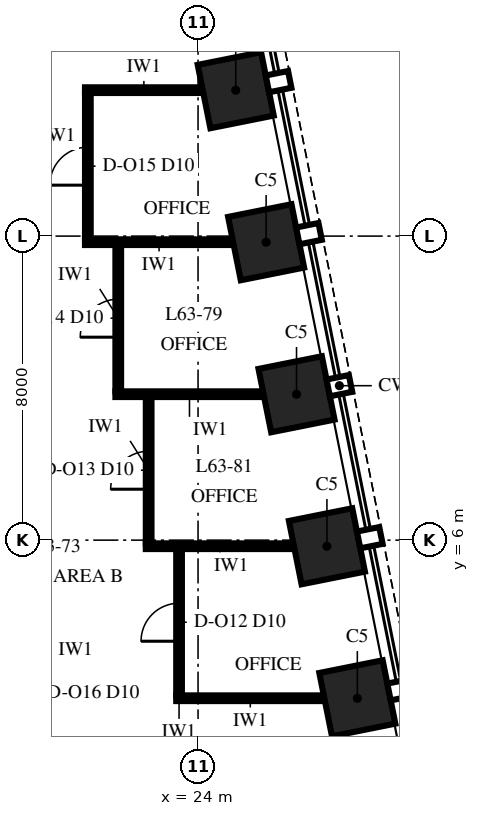
"""IFC4 building model, lengths in metres.
Left out: names, types, materials, properties, quantities, classifications, styles, units other than length and angle.
Written with IfcOpenShell. Run it as: python <this file> out.ifc"""

import sys

from ifc_helpers import new_model, si_unit, direction, frame, frame_2d, origin, origin_2d, place, context, subcontext, project, spatial, rectangle, extrude, element, fill, save


model = new_model("IFC4")
c1 = context("Model", 3, precision=1e-05, world=origin(), true_north=direction((0.0, 1.0)))
c2 = subcontext(c1, "Body", "Model", "MODEL_VIEW")
j1 = project(units=[si_unit("LENGTHUNIT", "METRE"), si_unit("PLANEANGLEUNIT", "RADIAN")], contexts=[c1])
p1 = place(None, origin())
s1 = spatial("IfcSite", under=j1, at=p1, CompositionType="ELEMENT")
p2 = place(p1, origin())
s2 = spatial("IfcBuilding", under=s1, at=p2, CompositionType="ELEMENT")
p3 = place(p2, frame((0.0, 0.0, 272.0)))
s3 = spatial("IfcBuildingStorey", under=s2, at=p3, CompositionType="ELEMENT", Elevation=272.0)
for number, where, z_axis, x_axis in (
    (1, (28.191, 1.838, 0.0), (0.0, 0.0, 1.0), (-0.196, 0.981, 0.0)),
    (2, (27.391, 5.838, 0.0), (0.0, 0.0, 1.0), (-0.196, 0.981, 0.0)),
    (3, (26.591, 9.838, 0.0), (0.0, 0.0, 1.0), (-0.196, 0.981, 0.0)),
    (4, (25.791, 13.838, 0.0), (0.0, 0.0, 1.0), (-0.196, 0.981, 0.0)),
    (5, (24.991, 17.838, 0.0), (0.0, 0.0, 1.0), (-0.196, 0.981, 0.0)),
):
    element("IfcColumn", number, at=place(p3, frame(where, z_axis=z_axis, x_axis=x_axis)), inside=s3, PredefinedType="COLUMN", context=c2, shape_type="SweptSolid", body=[
        extrude(rectangle(XDim=1.7, YDim=1.7, at=origin_2d()), origin(), (0.0, 0.0, 1.0), 4.0),
    ])
p4 = place(p3, frame((23.425, 1.84, 0.0), z_axis=(0.0, 0.0, 1.0), x_axis=(1.0, 0.0, 0.0)))
e6 = element("IfcWall", 6, at=p4, inside=s3, PredefinedType="PARTITIONING", context=c2, shape_type="SweptSolid", body=[
    extrude(rectangle(XDim=3.899, YDim=0.15, at=frame_2d((1.949, 0.0))), origin(), (0.0, 0.0, 1.0), 3.23),
])
p5 = place(p3, frame((22.625, 5.84, 0.0), z_axis=(0.0, 0.0, 1.0), x_axis=(1.0, 0.0, 0.0)))
e7 = element("IfcWall", 7, at=p5, inside=s3, PredefinedType="PARTITIONING", context=c2, shape_type="SweptSolid", body=[
    extrude(rectangle(XDim=3.899, YDim=0.15, at=frame_2d((1.949, 0.0))), origin(), (0.0, 0.0, 1.0), 2.842),
])
for number, where, z_axis, x_axis in (
    (8, (21.825, 9.84, 0.0), (0.0, 0.0, 1.0), (1.0, 0.0, 0.0)),
    (9, (21.025, 13.84, 0.0), (0.0, 0.0, 1.0), (1.0, 0.0, 0.0)),
):
    element("IfcWall", number, at=place(p3, frame(where, z_axis=z_axis, x_axis=x_axis)), inside=s3, PredefinedType="PARTITIONING", context=c2, shape_type="SweptSolid", body=[
        extrude(rectangle(XDim=3.899, YDim=0.15, at=frame_2d((1.949, 0.0))), origin(), (0.0, 0.0, 1.0), 3.23),
    ])
p6 = place(p3, frame((21.025, 17.84, 0.0), z_axis=(0.0, 0.0, 1.0), x_axis=(1.0, 0.0, 0.0)))
e10 = element("IfcWall", 10, at=p6, inside=s3, PredefinedType="PARTITIONING", context=c2, shape_type="SweptSolid", body=[
    extrude(rectangle(XDim=3.099, YDim=0.15, at=frame_2d((1.549, 0.0))), origin(), (0.0, 0.0, 1.0), 3.23),
])
p7 = place(p3, frame((21.1, 13.915, 0.0), z_axis=(0.0, 0.0, 1.0), x_axis=(0.0, 1.0, 0.0)))
e11 = element("IfcWall", 11, at=p7, inside=s3, PredefinedType="PARTITIONING", context=c2, shape_type="SweptSolid", body=[
    extrude(rectangle(XDim=3.85, YDim=0.15, at=frame_2d((1.925, 0.0))), origin(), (0.0, 0.0, 1.0), 3.23),
])
p8 = place(p7, frame((1.425, 0.0, 0.0)))
e12 = element("IfcOpeningElement", 12, at=p8, cuts=e11, PredefinedType="OPENING", context=c2, shape_type="SweptSolid", body=[
    extrude(rectangle(XDim=1.0, YDim=2.3, at=frame_2d((0.5, 1.15))), frame((0.0, 0.09, 0.0), z_axis=(0.0, -1.0, 0.0), x_axis=(1.0, 0.0, 0.0)), (0.0, 0.0, 1.0), 0.18),
])
p9 = place(p3, frame((21.9, 9.915, 0.0), z_axis=(0.0, 0.0, 1.0), x_axis=(0.0, 1.0, 0.0)))
e13 = element("IfcWall", 13, at=p9, inside=s3, PredefinedType="PARTITIONING", context=c2, shape_type="SweptSolid", body=[
    extrude(rectangle(XDim=3.85, YDim=0.15, at=frame_2d((1.925, 0.0))), origin(), (0.0, 0.0, 1.0), 3.85),
])
p10 = place(p9, frame((1.425, 0.0, 0.0)))
e14 = element("IfcOpeningElement", 14, at=p10, cuts=e13, PredefinedType="OPENING", context=c2, shape_type="SweptSolid", body=[
    extrude(rectangle(XDim=1.0, YDim=2.3, at=frame_2d((0.5, 1.15))), frame((0.0, 0.09, 0.0), z_axis=(0.0, -1.0, 0.0), x_axis=(1.0, 0.0, 0.0)), (0.0, 0.0, 1.0), 0.18),
])
p11 = place(p3, frame((22.7, 5.915, 0.0), z_axis=(0.0, 0.0, 1.0), x_axis=(0.0, 1.0, 0.0)))
e15 = element("IfcWall", 15, at=p11, inside=s3, PredefinedType="PARTITIONING", context=c2, shape_type="SweptSolid", body=[
    extrude(rectangle(XDim=3.85, YDim=0.15, at=frame_2d((1.925, 0.0))), origin(), (0.0, 0.0, 1.0), 2.842),
])
p12 = place(p11, frame((1.425, 0.0, 0.0)))
e16 = element("IfcOpeningElement", 16, at=p12, cuts=e15, PredefinedType="OPENING", context=c2, shape_type="SweptSolid", body=[
    extrude(rectangle(XDim=1.0, YDim=2.3, at=frame_2d((0.5, 1.15))), frame((0.0, 0.09, 0.0), z_axis=(0.0, -1.0, 0.0), x_axis=(1.0, 0.0, 0.0)), (0.0, 0.0, 1.0), 0.18),
])
p13 = place(p3, frame((23.5, 1.915, 0.0), z_axis=(0.0, 0.0, 1.0), x_axis=(0.0, 1.0, 0.0)))
e17 = element("IfcWall", 17, at=p13, inside=s3, PredefinedType="PARTITIONING", context=c2, shape_type="SweptSolid", body=[
    extrude(rectangle(XDim=3.85, YDim=0.15, at=frame_2d((1.925, 0.0))), origin(), (0.0, 0.0, 1.0), 3.85),
])
p14 = place(p13, frame((1.425, 0.0, 0.0)))
e18 = element("IfcOpeningElement", 18, at=p14, cuts=e17, PredefinedType="OPENING", context=c2, shape_type="SweptSolid", body=[
    extrude(rectangle(XDim=1.0, YDim=2.3, at=frame_2d((0.5, 1.15))), frame((0.0, 0.09, 0.0), z_axis=(0.0, -1.0, 0.0), x_axis=(1.0, 0.0, 0.0)), (0.0, 0.0, 1.0), 0.18),
])
p15 = place(p14, origin())
e19 = element("IfcDoor", 19, at=p15, inside=s3, OperationType="SINGLE_SWING_LEFT", PredefinedType="DOOR", context=c2, shape_type="SweptSolid", body=[
    extrude(rectangle(XDim=1.0, YDim=2.3, at=frame_2d((0.5, 1.15))), frame((0.0, 0.075, 0.0), z_axis=(0.0, -1.0, 0.0), x_axis=(1.0, 0.0, 0.0)), (0.0, 0.0, 1.0), 0.149),
])
fill(e18, e19)
p16 = place(p12, origin())
e20 = element("IfcDoor", 20, at=p16, inside=s3, OperationType="SINGLE_SWING_LEFT", PredefinedType="DOOR", context=c2, shape_type="SweptSolid", body=[
    extrude(rectangle(XDim=1.0, YDim=2.3, at=frame_2d((0.5, 1.15))), frame((0.0, 0.075, 0.0), z_axis=(0.0, -1.0, 0.0), x_axis=(1.0, 0.0, 0.0)), (0.0, 0.0, 1.0), 0.149),
])
fill(e16, e20)
p17 = place(p10, origin())
e21 = element("IfcDoor", 21, at=p17, inside=s3, OperationType="SINGLE_SWING_LEFT", PredefinedType="DOOR", context=c2, shape_type="SweptSolid", body=[
    extrude(rectangle(XDim=1.0, YDim=2.3, at=frame_2d((0.5, 1.15))), frame((0.0, 0.075, 0.0), z_axis=(0.0, -1.0, 0.0), x_axis=(1.0, 0.0, 0.0)), (0.0, 0.0, 1.0), 0.149),
])
fill(e14, e21)
p18 = place(p8, origin())
e22 = element("IfcDoor", 22, at=p18, inside=s3, OperationType="SINGLE_SWING_LEFT", PredefinedType="DOOR", context=c2, shape_type="SweptSolid", body=[
    extrude(rectangle(XDim=1.0, YDim=2.3, at=frame_2d((0.5, 1.15))), frame((0.0, 0.075, 0.0), z_axis=(0.0, -1.0, 0.0), x_axis=(1.0, 0.0, 0.0)), (0.0, 0.0, 1.0), 0.149),
])
fill(e12, e22)
save(model, sys.argv[1])
